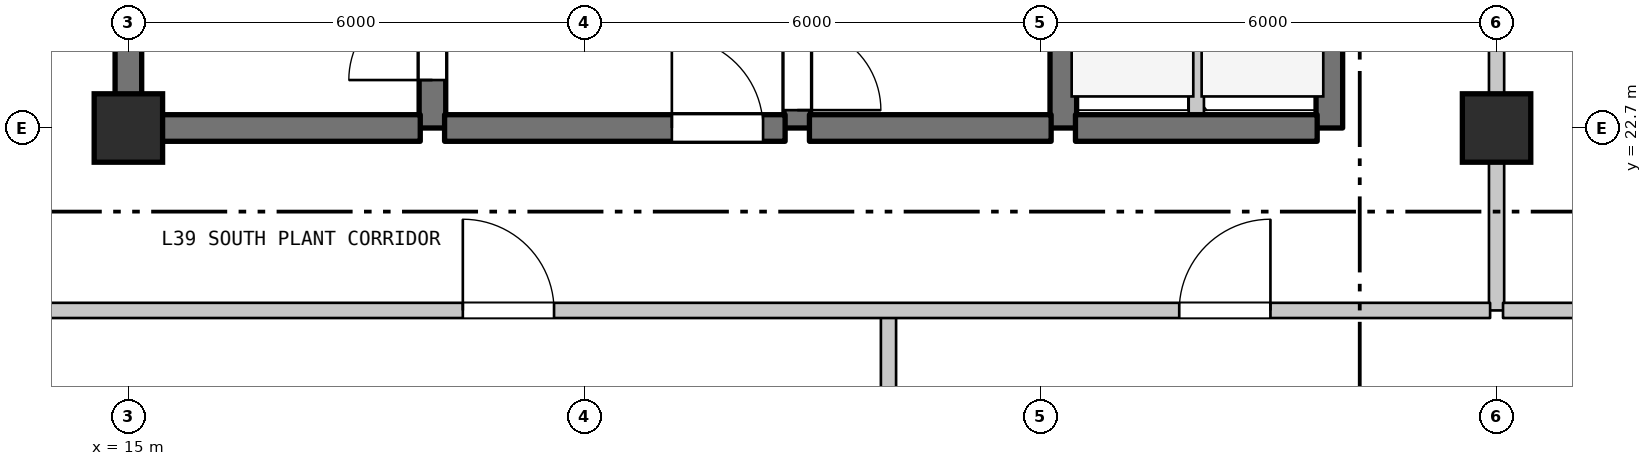
"""IFC4 building model, lengths in metres.
Left out: names, types, materials, properties, quantities, classifications, styles, units other than length and angle.
Written with IfcOpenShell. Run it as: python <this file> out.ifc"""

import sys

from ifc_helpers import new_model, si_unit, direction, frame, frame_2d, origin, origin_2d, place, context, subcontext, project, spatial, rectangle, extrude, element, fill, save


model = new_model("IFC4")
c1 = context("Model", 3, precision=1e-05, world=origin(), true_north=direction((0.0, 1.0)))
c2 = subcontext(c1, "Body", "Model", "MODEL_VIEW")
j1 = project(units=[si_unit("LENGTHUNIT", "METRE"), si_unit("PLANEANGLEUNIT", "RADIAN")], contexts=[c1])
p1 = place(None, origin())
s1 = spatial("IfcSite", under=j1, at=p1, CompositionType="ELEMENT")
p2 = place(p1, origin())
s2 = spatial("IfcBuilding", under=s1, at=p2, CompositionType="ELEMENT")
p3 = place(p2, frame((0.0, 0.0, 159.4)))
s3 = spatial("IfcBuildingStorey", under=s2, at=p3, CompositionType="ELEMENT", Elevation=159.4)
for number, where, z_axis, x_axis in (
    (1, (15.0, 22.7, 0.0), (0.0, 0.0, 1.0), (1.0, 0.0, 0.0)),
    (2, (33.0, 22.7, 0.0), (0.0, 0.0, 1.0), (1.0, 0.0, 0.0)),
):
    element("IfcColumn", number, at=place(p3, frame(where, z_axis=z_axis, x_axis=x_axis)), inside=s3, PredefinedType="COLUMN", context=c2, shape_type="SweptSolid", body=[
        extrude(rectangle(XDim=0.9, YDim=0.9, at=origin_2d()), origin(), (0.0, 0.0, 1.0), 5.2),
    ])
p4 = place(p3, frame((15.0, 22.7, 0.0), z_axis=(0.0, 0.0, 1.0), x_axis=(0.0, 1.0, 0.0)))
e3 = element("IfcWall", 3, at=p4, inside=s3, PredefinedType="SHEAR", context=c2, shape_type="SweptSolid", body=[
    extrude(rectangle(XDim=6.8, YDim=0.35, at=frame_2d((3.4, 0.0))), origin(), (0.0, 0.0, 1.0), 4.89),
])
p5 = place(p3, frame((19.0, 22.7, 0.0), z_axis=(0.0, 0.0, 1.0), x_axis=(0.0, 1.0, 0.0)))
e4 = element("IfcWall", 4, at=p5, inside=s3, PredefinedType="SHEAR", context=c2, shape_type="SweptSolid", body=[
    extrude(rectangle(XDim=5.5, YDim=0.35, at=frame_2d((2.75, 0.0))), origin(), (0.0, 0.0, 1.0), 4.89),
])
p6 = place(p5, frame((0.631, 0.0, 0.0)))
e5 = element("IfcOpeningElement", 5, at=p6, cuts=e4, PredefinedType="OPENING", context=c2, shape_type="SweptSolid", body=[
    extrude(rectangle(XDim=1.1, YDim=2.15, at=frame_2d((0.55, 1.075))), frame((0.0, 0.185, 0.0), z_axis=(0.0, -1.0, 0.0), x_axis=(1.0, 0.0, 0.0)), (0.0, 0.0, 1.0), 0.37),
])
p7 = place(p3, frame((23.8, 22.7, 0.0), z_axis=(0.0, 0.0, 1.0), x_axis=(0.0, 1.0, 0.0)))
e6 = element("IfcWall", 6, at=p7, inside=s3, PredefinedType="SHEAR", context=c2, shape_type="SweptSolid", body=[
    extrude(rectangle(XDim=5.5, YDim=0.35, at=frame_2d((2.75, 0.0))), origin(), (0.0, 0.0, 1.0), 4.89),
])
p8 = place(p7, frame((0.235, 0.0, 0.0)))
e7 = element("IfcOpeningElement", 7, at=p8, cuts=e6, PredefinedType="OPENING", context=c2, shape_type="SweptSolid", body=[
    extrude(rectangle(XDim=1.1, YDim=2.15, at=frame_2d((0.55, 1.075))), frame((0.0, 0.185, 0.0), z_axis=(0.0, -1.0, 0.0), x_axis=(1.0, 0.0, 0.0)), (0.0, 0.0, 1.0), 0.37),
])
p9 = place(p3, frame((25.0, 0.71, 0.0), z_axis=(0.0, 0.0, 1.0), x_axis=(0.0, 1.0, 0.0)))
e8 = element("IfcWall", 8, at=p9, inside=s3, PredefinedType="STANDARD", context=c2, shape_type="SweptSolid", body=[
    extrude(rectangle(XDim=19.59, YDim=0.2, at=frame_2d((9.795, 0.0))), origin(), (0.0, 0.0, 1.0), 4.89),
])
p10 = place(p3, frame((27.3, 22.7, 0.0), z_axis=(0.0, 0.0, 1.0), x_axis=(0.0, 1.0, 0.0)))
e9 = element("IfcWall", 9, at=p10, inside=s3, PredefinedType="SHEAR", context=c2, shape_type="SweptSolid", body=[
    extrude(rectangle(XDim=2.9, YDim=0.35, at=frame_2d((1.45, 0.0))), origin(), (0.0, 0.0, 1.0), 4.89),
])
p11 = place(p3, frame((29.05, 22.7, 0.0), z_axis=(0.0, 0.0, 1.0), x_axis=(0.0, 1.0, 0.0)))
e10 = element("IfcWall", 10, at=p11, inside=s3, PredefinedType="STANDARD", context=c2, shape_type="SweptSolid", body=[
    extrude(rectangle(XDim=2.9, YDim=0.2, at=frame_2d((1.45, 0.0))), origin(), (0.0, 0.0, 1.0), 4.89),
])
p12 = place(p3, frame((30.8, 22.7, 0.0), z_axis=(0.0, 0.0, 1.0), x_axis=(0.0, 1.0, 0.0)))
e11 = element("IfcWall", 11, at=p12, inside=s3, PredefinedType="SHEAR", context=c2, shape_type="SweptSolid", body=[
    extrude(rectangle(XDim=2.9, YDim=0.35, at=frame_2d((1.45, 0.0))), origin(), (0.0, 0.0, 1.0), 4.89),
])
p13 = place(p3, frame((33.0, 20.3, 0.0), z_axis=(0.0, 0.0, 1.0), x_axis=(0.0, 1.0, 0.0)))
e12 = element("IfcWall", 12, at=p13, inside=s3, PredefinedType="STANDARD", context=c2, shape_type="SweptSolid", body=[
    extrude(rectangle(XDim=7.6, YDim=0.2, at=frame_2d((3.8, 0.0))), origin(), (0.0, 0.0, 1.0), 4.49),
])
p14 = place(p13, frame((4.6, 0.0, 0.0)))
e13 = element("IfcOpeningElement", 13, at=p14, cuts=e12, PredefinedType="OPENING", context=c2, shape_type="SweptSolid", body=[
    extrude(rectangle(XDim=1.2, YDim=2.2, at=frame_2d((0.6, 1.1))), frame((0.0, 0.11, 0.0), z_axis=(0.0, -1.0, 0.0), x_axis=(1.0, 0.0, 0.0)), (0.0, 0.0, 1.0), 0.22),
])
p15 = place(p3, frame((12.6, 20.3, 0.0), z_axis=(0.0, 0.0, 1.0), x_axis=(1.0, 0.0, 0.0)))
e14 = element("IfcWall", 14, at=p15, inside=s3, PredefinedType="STANDARD", context=c2, shape_type="SweptSolid", body=[
    extrude(rectangle(XDim=20.315, YDim=0.2, at=frame_2d((10.157, 0.0))), origin(), (0.0, 0.0, 1.0), 4.89),
])
p16 = place(p15, frame((6.8, 0.0, 0.0)))
e15 = element("IfcOpeningElement", 15, at=p16, cuts=e14, PredefinedType="OPENING", context=c2, shape_type="SweptSolid", body=[
    extrude(rectangle(XDim=1.2, YDim=2.2, at=frame_2d((0.6, 1.1))), frame((0.0, 0.11, 0.0), z_axis=(0.0, -1.0, 0.0), x_axis=(1.0, 0.0, 0.0)), (0.0, 0.0, 1.0), 0.22),
])
p17 = place(p15, frame((16.225, 0.0, 0.0)))
e16 = element("IfcOpeningElement", 16, at=p17, cuts=e14, PredefinedType="OPENING", context=c2, shape_type="SweptSolid", body=[
    extrude(rectangle(XDim=1.2, YDim=2.2, at=frame_2d((0.6, 1.1))), frame((0.0, 0.11, 0.0), z_axis=(0.0, -1.0, 0.0), x_axis=(1.0, 0.0, 0.0)), (0.0, 0.0, 1.0), 0.22),
])
p18 = place(p3, frame((33.085, 20.3, 0.0), z_axis=(0.0, 0.0, 1.0), x_axis=(1.0, 0.0, 0.0)))
e17 = element("IfcWall", 17, at=p18, inside=s3, PredefinedType="STANDARD", context=c2, shape_type="SweptSolid", body=[
    extrude(rectangle(XDim=23.905, YDim=0.2, at=frame_2d((11.953, 0.0))), origin(), (0.0, 0.0, 1.0), 4.89),
])
p19 = place(p3, frame((15.16, 22.7, 0.0), z_axis=(0.0, 0.0, 1.0), x_axis=(1.0, 0.0, 0.0)))
e18 = element("IfcWall", 18, at=p19, inside=s3, PredefinedType="SHEAR", context=c2, shape_type="SweptSolid", body=[
    extrude(rectangle(XDim=3.68, YDim=0.35, at=frame_2d((1.84, 0.0))), origin(), (0.0, 0.0, 1.0), 4.89),
])
p20 = place(p3, frame((19.16, 22.7, 0.0), z_axis=(0.0, 0.0, 1.0), x_axis=(1.0, 0.0, 0.0)))
e19 = element("IfcWall", 19, at=p20, inside=s3, PredefinedType="SHEAR", context=c2, shape_type="SweptSolid", body=[
    extrude(rectangle(XDim=4.48, YDim=0.35, at=frame_2d((2.24, 0.0))), origin(), (0.0, 0.0, 1.0), 4.89),
])
p21 = place(p20, frame((2.99, 0.0, 0.0)))
e20 = element("IfcOpeningElement", 20, at=p21, cuts=e19, PredefinedType="OPENING", context=c2, shape_type="SweptSolid", body=[
    extrude(rectangle(XDim=1.2, YDim=2.2, at=frame_2d((0.6, 1.1))), frame((0.0, 0.185, 0.0), z_axis=(0.0, -1.0, 0.0), x_axis=(1.0, 0.0, 0.0)), (0.0, 0.0, 1.0), 0.37),
])
for number, where, z_axis, x_axis in (
    (21, (23.96, 22.7, 0.0), (0.0, 0.0, 1.0), (1.0, 0.0, 0.0)),
    (22, (27.46, 22.7, 0.0), (0.0, 0.0, 1.0), (1.0, 0.0, 0.0)),
):
    element("IfcWall", number, at=place(p3, frame(where, z_axis=z_axis, x_axis=x_axis)), inside=s3, PredefinedType="SHEAR", context=c2, shape_type="SweptSolid", body=[
        extrude(rectangle(XDim=3.18, YDim=0.35, at=frame_2d((1.59, 0.0))), origin(), (0.0, 0.0, 1.0), 4.89),
    ])
p22 = place(p3, frame((15.848, 11.28, 0.0), z_axis=(0.0, 0.0, 1.0), x_axis=(-0.74740761421, 0.664365756358, 0.0)))
e23 = element("IfcWall", 23, at=p22, inside=s3, PredefinedType="STANDARD", context=c2, shape_type="SweptSolid", body=[
    extrude(rectangle(XDim=15.805, YDim=0.26, at=frame_2d((7.903, 0.0))), origin(), (0.0, 0.0, 1.0), 4.89),
])
p23 = place(p6, origin())
e24 = element("IfcDoor", 24, at=p23, inside=s3, OperationType="SINGLE_SWING_LEFT", PredefinedType="DOOR", context=c2, shape_type="SweptSolid", body=[
    extrude(rectangle(XDim=1.1, YDim=2.15, at=frame_2d((0.55, 1.075))), frame((0.0, 0.025, 0.0), z_axis=(0.0, -1.0, 0.0), x_axis=(1.0, 0.0, 0.0)), (0.0, 0.0, 1.0), 0.05),
])
fill(e5, e24)
p24 = place(p8, frame((1.1, 0.0, 0.0), z_axis=(0.0, 0.0, 1.0), x_axis=(-1.0, 0.0, 0.0)))
e25 = element("IfcDoor", 25, at=p24, inside=s3, OperationType="SINGLE_SWING_LEFT", PredefinedType="DOOR", context=c2, shape_type="SweptSolid", body=[
    extrude(rectangle(XDim=1.1, YDim=2.15, at=frame_2d((0.55, 1.075))), frame((0.0, 0.025, 0.0), z_axis=(0.0, -1.0, 0.0), x_axis=(1.0, 0.0, 0.0)), (0.0, 0.0, 1.0), 0.05),
])
fill(e7, e25)
p25 = place(p16, origin())
e26 = element("IfcDoor", 26, at=p25, inside=s3, OperationType="SINGLE_SWING_LEFT", PredefinedType="DOOR", context=c2, shape_type="SweptSolid", body=[
    extrude(rectangle(XDim=1.2, YDim=2.2, at=frame_2d((0.6, 1.1))), frame((0.0, 0.025, 0.0), z_axis=(0.0, -1.0, 0.0), x_axis=(1.0, 0.0, 0.0)), (0.0, 0.0, 1.0), 0.05),
])
fill(e15, e26)
p26 = place(p17, origin())
e27 = element("IfcDoor", 27, at=p26, inside=s3, OperationType="SINGLE_SWING_RIGHT", PredefinedType="DOOR", context=c2, shape_type="SweptSolid", body=[
    extrude(rectangle(XDim=1.2, YDim=2.2, at=frame_2d((0.6, 1.1))), frame((0.0, 0.025, 0.0), z_axis=(0.0, -1.0, 0.0), x_axis=(1.0, 0.0, 0.0)), (0.0, 0.0, 1.0), 0.05),
])
fill(e16, e27)
p27 = place(p21, origin())
e28 = element("IfcDoor", 28, at=p27, inside=s3, OperationType="SINGLE_SWING_LEFT", PredefinedType="DOOR", context=c2, shape_type="SweptSolid", body=[
    extrude(rectangle(XDim=1.2, YDim=2.2, at=frame_2d((0.6, 1.1))), frame((0.0, 0.025, 0.0), z_axis=(0.0, -1.0, 0.0), x_axis=(1.0, 0.0, 0.0)), (0.0, 0.0, 1.0), 0.05),
])
fill(e20, e28)
save(model, sys.argv[1])
